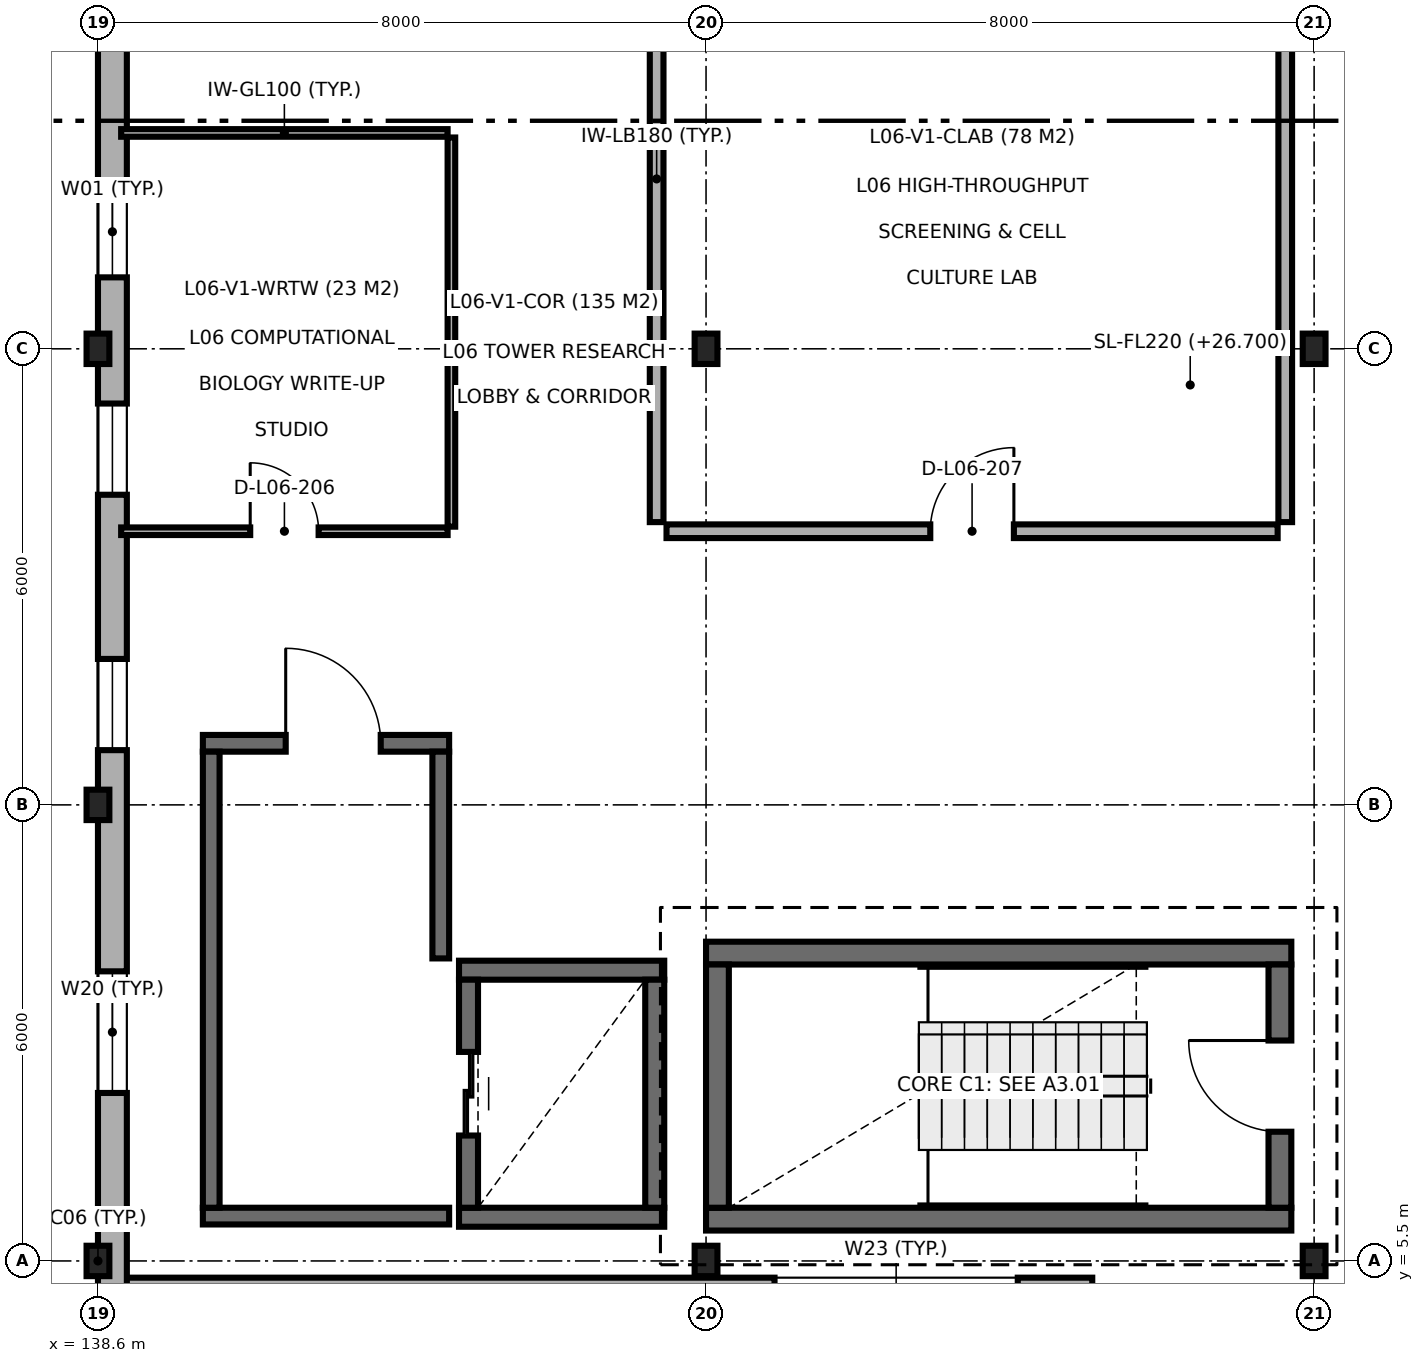
"""IFC4 building model, lengths in metres.
Left out: names, types, materials, properties, quantities, classifications, styles, units other than length and angle.
Written with IfcOpenShell. Run it as: python <this file> out.ifc"""

import sys

from ifc_helpers import new_model, si_unit, direction, frame, frame_2d, origin, origin_2d, place, context, subcontext, project, spatial, rectangle, i_section, extrude, element, fill, save


model = new_model("IFC4")
c1 = context("Model", 3, precision=1e-05, world=origin(), true_north=direction((0.0, 1.0)))
c2 = subcontext(c1, "Body", "Model", "MODEL_VIEW")
j1 = project(units=[si_unit("LENGTHUNIT", "METRE"), si_unit("PLANEANGLEUNIT", "RADIAN")], contexts=[c1])
p1 = place(None, origin())
s1 = spatial("IfcSite", under=j1, at=p1, CompositionType="ELEMENT")
p2 = place(p1, origin())
s2 = spatial("IfcBuilding", under=s1, at=p2, CompositionType="ELEMENT")
p3 = place(p2, frame((0.0, 0.0, 26.7)))
s3 = spatial("IfcBuildingStorey", under=s2, at=p3, CompositionType="ELEMENT", Elevation=26.7)
for number, where, z_axis, x_axis in (
    (1, (138.6, 5.5, 0.0), (0.0, 0.0, 1.0), (1.0, 0.0, 0.0)),
    (2, (138.6, 11.5, 0.0), (0.0, 0.0, 1.0), (1.0, 0.0, 0.0)),
    (3, (138.6, 17.5, 0.0), (0.0, 0.0, 1.0), (1.0, 0.0, 0.0)),
    (4, (146.6, 5.5, 0.0), (0.0, 0.0, 1.0), (1.0, 0.0, 0.0)),
    (5, (146.6, 17.5, 0.0), (0.0, 0.0, 1.0), (1.0, 0.0, 0.0)),
    (6, (154.6, 5.5, 0.0), (0.0, 0.0, 1.0), (1.0, 0.0, 0.0)),
    (7, (154.6, 17.5, 0.0), (0.0, 0.0, 1.0), (1.0, 0.0, 0.0)),
):
    element("IfcColumn", number, at=place(p3, frame(where, z_axis=z_axis, x_axis=x_axis)), inside=s3, PredefinedType="COLUMN", context=c2, shape_type="SweptSolid", body=[
        extrude(i_section(OverallWidth=0.3, OverallDepth=0.4, WebThickness=0.013, FlangeThickness=0.024, FilletRadius=0.027, at=origin_2d()), origin(), (0.0, 0.0, 1.0), 3.9),
    ])
for number, where, z_axis, x_axis in (
    (8, (146.6, 6.05, 0.0), (0.0, 0.0, 1.0), (1.0, 0.0, 0.0)),
    (9, (154.3, 9.55, 0.0), (0.0, 0.0, 1.0), (-1.0, 0.0, 0.0)),
):
    element("IfcWall", number, at=place(p3, frame(where, z_axis=z_axis, x_axis=x_axis)), inside=s3, PredefinedType="SHEAR", context=c2, shape_type="SweptSolid", body=[
        extrude(rectangle(XDim=7.7, YDim=0.3, at=frame_2d((3.85, 0.0))), origin(), (0.0, 0.0, 1.0), 3.9),
    ])
p4 = place(p3, frame((146.75, 9.4, 0.0), z_axis=(0.0, 0.0, 1.0), x_axis=(0.0, -1.0, 0.0)))
e10 = element("IfcWall", 10, at=p4, inside=s3, PredefinedType="SHEAR", context=c2, shape_type="SweptSolid", body=[
    extrude(rectangle(XDim=3.2, YDim=0.3, at=frame_2d((1.6, 0.0))), origin(), (0.0, 0.0, 1.0), 3.9),
])
p5 = place(p3, frame((154.15, 6.2, 0.0), z_axis=(0.0, 0.0, 1.0), x_axis=(0.0, 1.0, 0.0)))
e11 = element("IfcWall", 11, at=p5, inside=s3, PredefinedType="SHEAR", context=c2, shape_type="SweptSolid", body=[
    extrude(rectangle(XDim=3.2, YDim=0.3, at=frame_2d((1.6, 0.0))), origin(), (0.0, 0.0, 1.0), 3.9),
])
p6 = place(p5, frame((1.0, 0.0, 0.0)))
e12 = element("IfcOpeningElement", 12, at=p6, cuts=e11, PredefinedType="OPENING", context=c2, shape_type="SweptSolid", body=[
    extrude(rectangle(XDim=1.2, YDim=2.15, at=frame_2d((0.6, 1.075))), frame((0.0, 0.16, 0.0), z_axis=(0.0, -1.0, 0.0), x_axis=(1.0, 0.0, 0.0)), (0.0, 0.0, 1.0), 0.32),
])
for number, where, z_axis, x_axis in (
    (13, (143.35, 6.075, 0.0), (0.0, 0.0, 1.0), (1.0, 0.0, 0.0)),
    (14, (146.05, 9.325, 0.0), (0.0, 0.0, 1.0), (-1.0, 0.0, 0.0)),
):
    element("IfcWall", number, at=place(p3, frame(where, z_axis=z_axis, x_axis=x_axis)), inside=s3, PredefinedType="SHEAR", context=c2, shape_type="SweptSolid", body=[
        extrude(rectangle(XDim=2.7, YDim=0.25, at=frame_2d((1.35, 0.0))), origin(), (0.0, 0.0, 1.0), 3.9),
    ])
p7 = place(p3, frame((143.475, 9.2, 0.0), z_axis=(0.0, 0.0, 1.0), x_axis=(0.0, -1.0, 0.0)))
e15 = element("IfcWall", 15, at=p7, inside=s3, PredefinedType="SHEAR", context=c2, shape_type="SweptSolid", body=[
    extrude(rectangle(XDim=3.0, YDim=0.25, at=frame_2d((1.5, 0.0))), origin(), (0.0, 0.0, 1.0), 3.9),
])
p8 = place(p7, frame((0.95, 0.0, 0.0)))
e16 = element("IfcOpeningElement", 16, at=p8, cuts=e15, PredefinedType="OPENING", context=c2, shape_type="SweptSolid", body=[
    extrude(rectangle(XDim=1.1, YDim=2.15, at=frame_2d((0.55, 1.075))), frame((0.0, 0.135, 0.0), z_axis=(0.0, -1.0, 0.0), x_axis=(1.0, 0.0, 0.0)), (0.0, 0.0, 1.0), 0.27),
])
p9 = place(p3, frame((145.925, 6.2, 0.0), z_axis=(0.0, 0.0, 1.0), x_axis=(0.0, 1.0, 0.0)))
e17 = element("IfcWall", 17, at=p9, inside=s3, PredefinedType="SHEAR", context=c2, shape_type="SweptSolid", body=[
    extrude(rectangle(XDim=3.0, YDim=0.25, at=frame_2d((1.5, 0.0))), origin(), (0.0, 0.0, 1.0), 3.9),
])
p10 = place(p3, frame((139.98, 6.09, 0.0), z_axis=(0.0, 0.0, 1.0), x_axis=(1.0, 0.0, 0.0)))
e18 = element("IfcWall", 18, at=p10, inside=s3, PredefinedType="SOLIDWALL", context=c2, shape_type="SweptSolid", body=[
    extrude(rectangle(XDim=3.24, YDim=0.22, at=frame_2d((1.62, 0.0))), origin(), (0.0, 0.0, 1.0), 3.68),
])
p11 = place(p3, frame((143.22, 12.31, 0.0), z_axis=(0.0, 0.0, 1.0), x_axis=(-1.0, 0.0, 0.0)))
e19 = element("IfcWall", 19, at=p11, inside=s3, PredefinedType="SOLIDWALL", context=c2, shape_type="SweptSolid", body=[
    extrude(rectangle(XDim=3.24, YDim=0.22, at=frame_2d((1.62, 0.0))), origin(), (0.0, 0.0, 1.0), 3.68),
])
p12 = place(p11, frame((0.9, 0.0, 0.0)))
e20 = element("IfcOpeningElement", 20, at=p12, cuts=e19, PredefinedType="OPENING", context=c2, shape_type="SweptSolid", body=[
    extrude(rectangle(XDim=1.25, YDim=2.15, at=frame_2d((0.625, 1.075))), frame((0.0, 0.12, 0.0), z_axis=(0.0, -1.0, 0.0), x_axis=(1.0, 0.0, 0.0)), (0.0, 0.0, 1.0), 0.24),
])
p13 = place(p3, frame((140.09, 12.2, 0.0), z_axis=(0.0, 0.0, 1.0), x_axis=(0.0, -1.0, 0.0)))
e21 = element("IfcWall", 21, at=p13, inside=s3, PredefinedType="SOLIDWALL", context=c2, shape_type="SweptSolid", body=[
    extrude(rectangle(XDim=6.0, YDim=0.22, at=frame_2d((3.0, 0.0))), origin(), (0.0, 0.0, 1.0), 3.68),
])
p14 = place(p3, frame((143.11, 9.48, 0.0), z_axis=(0.0, 0.0, 1.0), x_axis=(0.0, 1.0, 0.0)))
e22 = element("IfcWall", 22, at=p14, inside=s3, PredefinedType="SOLIDWALL", context=c2, shape_type="SweptSolid", body=[
    extrude(rectangle(XDim=2.72, YDim=0.22, at=frame_2d((1.36, 0.0))), origin(), (0.0, 0.0, 1.0), 3.68),
])
p15 = place(p3, frame((138.962, 5.09, 0.0), z_axis=(0.0, 0.0, 1.0), x_axis=(1.0, 0.0, 0.0)))
e23 = element("IfcWall", 23, at=p15, inside=s3, PredefinedType="SOLIDWALL", context=c2, shape_type="SweptSolid", body=[
    extrude(rectangle(XDim=12.719, YDim=0.38, at=frame_2d((6.359, 0.0))), origin(), (0.0, 0.0, 1.0), 3.68),
])
p16 = place(p15, frame((8.539, 0.0, 0.9)))
e24 = element("IfcOpeningElement", 24, at=p16, cuts=e23, PredefinedType="OPENING", context=c2, shape_type="SweptSolid", body=[
    extrude(rectangle(XDim=3.2, YDim=2.4, at=frame_2d((1.6, 1.2))), frame((0.0, 0.2, 0.0), z_axis=(0.0, -1.0, 0.0), x_axis=(1.0, 0.0, 0.0)), (0.0, 0.0, 1.0), 0.4),
])
p17 = place(p3, frame((138.79, 29.138, 0.0), z_axis=(0.0, 0.0, 1.0), x_axis=(0.0, -1.0, 0.0)))
e25 = element("IfcWall", 25, at=p17, inside=s3, PredefinedType="SOLIDWALL", context=c2, shape_type="SweptSolid", body=[
    extrude(rectangle(XDim=24.238, YDim=0.38, at=frame_2d((12.119, 0.0))), origin(), (0.0, 0.0, 1.0), 3.68),
])
p18 = place(p17, frame((1.364, 0.0, 0.9)))
e26 = element("IfcOpeningElement", 26, at=p18, cuts=e25, PredefinedType="OPENING", context=c2, shape_type="SweptSolid", body=[
    extrude(rectangle(XDim=2.4, YDim=2.1, at=frame_2d((1.2, 1.05))), frame((0.0, 0.2, 0.0), z_axis=(0.0, -1.0, 0.0), x_axis=(1.0, 0.0, 0.0)), (0.0, 0.0, 1.0), 0.4),
])
p19 = place(p17, frame((9.498, 0.0, 0.9)))
e27 = element("IfcOpeningElement", 27, at=p19, cuts=e25, PredefinedType="OPENING", context=c2, shape_type="SweptSolid", body=[
    extrude(rectangle(XDim=1.2, YDim=1.8, at=frame_2d((0.6, 0.9))), frame((0.0, 0.2, 0.0), z_axis=(0.0, -1.0, 0.0), x_axis=(1.0, 0.0, 0.0)), (0.0, 0.0, 1.0), 0.4),
])
p20 = place(p17, frame((12.358, 0.0, 0.9)))
e28 = element("IfcOpeningElement", 28, at=p20, cuts=e25, PredefinedType="OPENING", context=c2, shape_type="SweptSolid", body=[
    extrude(rectangle(XDim=1.2, YDim=1.8, at=frame_2d((0.6, 0.9))), frame((0.0, 0.2, 0.0), z_axis=(0.0, -1.0, 0.0), x_axis=(1.0, 0.0, 0.0)), (0.0, 0.0, 1.0), 0.4),
])
p21 = place(p17, frame((15.718, 0.0, 0.9)))
e29 = element("IfcOpeningElement", 29, at=p21, cuts=e25, PredefinedType="OPENING", context=c2, shape_type="SweptSolid", body=[
    extrude(rectangle(XDim=1.2, YDim=1.8, at=frame_2d((0.6, 0.9))), frame((0.0, 0.2, 0.0), z_axis=(0.0, -1.0, 0.0), x_axis=(1.0, 0.0, 0.0)), (0.0, 0.0, 1.0), 0.4),
])
p22 = place(p17, frame((19.828, 0.0, 0.9)))
e30 = element("IfcOpeningElement", 30, at=p22, cuts=e25, PredefinedType="OPENING", context=c2, shape_type="SweptSolid", body=[
    extrude(rectangle(XDim=1.6, YDim=2.4, at=frame_2d((0.8, 1.2))), frame((0.0, 0.2, 0.0), z_axis=(0.0, -1.0, 0.0), x_axis=(1.0, 0.0, 0.0)), (0.0, 0.0, 1.0), 0.4),
])
p23 = place(p3, frame((138.905, 20.34, 0.0), z_axis=(0.0, 0.0, 1.0), x_axis=(1.0, 0.0, 0.0)))
e31 = element("IfcWall", 31, at=p23, inside=s3, PredefinedType="PARTITIONING", context=c2, shape_type="SweptSolid", body=[
    extrude(rectangle(XDim=4.295, YDim=0.1, at=frame_2d((2.147, 0.0))), origin(), (0.0, 0.0, 1.0), 3.68),
])
p24 = place(p3, frame((143.25, 15.16, 0.0), z_axis=(0.0, 0.0, 1.0), x_axis=(0.0, 1.0, 0.0)))
e32 = element("IfcWall", 32, at=p24, inside=s3, PredefinedType="PARTITIONING", context=c2, shape_type="SweptSolid", body=[
    extrude(rectangle(XDim=5.12, YDim=0.1, at=frame_2d((2.56, 0.0))), origin(), (0.0, 0.0, 1.0), 3.68),
])
p25 = place(p3, frame((138.905, 15.1, 0.0), z_axis=(0.0, 0.0, 1.0), x_axis=(1.0, 0.0, 0.0)))
e33 = element("IfcWall", 33, at=p25, inside=s3, PredefinedType="PARTITIONING", context=c2, shape_type="SweptSolid", body=[
    extrude(rectangle(XDim=4.295, YDim=0.1, at=frame_2d((2.147, 0.0))), origin(), (0.0, 0.0, 1.0), 3.68),
])
p26 = place(p25, frame((1.698, 0.0, 0.0)))
e34 = element("IfcOpeningElement", 34, at=p26, cuts=e33, PredefinedType="OPENING", context=c2, shape_type="SweptSolid", body=[
    extrude(rectangle(XDim=0.9, YDim=2.1, at=frame_2d((0.45, 1.05))), frame((0.0, 0.06, 0.0), z_axis=(0.0, -1.0, 0.0), x_axis=(1.0, 0.0, 0.0)), (0.0, 0.0, 1.0), 0.12),
])
for number, where, z_axis, x_axis in (
    (35, (145.95, 15.22, 0.0), (0.0, 0.0, 1.0), (0.0, 1.0, 0.0)),
    (36, (154.22, 15.22, 0.0), (0.0, 0.0, 1.0), (0.0, 1.0, 0.0)),
):
    element("IfcWall", number, at=place(p3, frame(where, z_axis=z_axis, x_axis=x_axis)), inside=s3, PredefinedType="PARTITIONING", context=c2, shape_type="SweptSolid", body=[
        extrude(rectangle(XDim=9.03, YDim=0.18, at=frame_2d((4.515, 0.0))), origin(), (0.0, 0.0, 1.0), 3.68),
    ])
p27 = place(p3, frame((146.08, 15.1, 0.0), z_axis=(0.0, 0.0, 1.0), x_axis=(1.0, 0.0, 0.0)))
e37 = element("IfcWall", 37, at=p27, inside=s3, PredefinedType="PARTITIONING", context=c2, shape_type="SweptSolid", body=[
    extrude(rectangle(XDim=8.04, YDim=0.18, at=frame_2d((4.02, 0.0))), origin(), (0.0, 0.0, 1.0), 3.68),
])
p28 = place(p27, frame((3.47, 0.0, 0.0)))
e38 = element("IfcOpeningElement", 38, at=p28, cuts=e37, PredefinedType="OPENING", context=c2, shape_type="SweptSolid", body=[
    extrude(rectangle(XDim=1.1, YDim=2.15, at=frame_2d((0.55, 1.075))), frame((0.0, 0.1, 0.0), z_axis=(0.0, -1.0, 0.0), x_axis=(1.0, 0.0, 0.0)), (0.0, 0.0, 1.0), 0.2),
])
p29 = place(p6, origin())
e39 = element("IfcDoor", 39, at=p29, inside=s3, OperationType="SINGLE_SWING_RIGHT", PredefinedType="DOOR", context=c2, shape_type="SweptSolid", body=[
    extrude(rectangle(XDim=1.2, YDim=2.15, at=frame_2d((0.6, 1.075))), frame((0.0, 0.025, 0.0), z_axis=(0.0, -1.0, 0.0), x_axis=(1.0, 0.0, 0.0)), (0.0, 0.0, 1.0), 0.05),
])
fill(e12, e39)
p30 = place(p8, origin())
e40 = element("IfcDoor", 40, at=p30, inside=s3, OperationType="DOUBLE_DOOR_SLIDING", PredefinedType="DOOR", context=c2, shape_type="SweptSolid", body=[
    extrude(rectangle(XDim=1.1, YDim=2.15, at=frame_2d((0.55, 1.075))), frame((0.0, 0.025, 0.0), z_axis=(0.0, -1.0, 0.0), x_axis=(1.0, 0.0, 0.0)), (0.0, 0.0, 1.0), 0.05),
])
fill(e16, e40)
p31 = place(p12, frame((1.25, 0.0, 0.0), z_axis=(0.0, 0.0, 1.0), x_axis=(-1.0, 0.0, 0.0)))
e41 = element("IfcDoor", 41, at=p31, inside=s3, OperationType="SINGLE_SWING_RIGHT", PredefinedType="DOOR", context=c2, shape_type="SweptSolid", body=[
    extrude(rectangle(XDim=1.25, YDim=2.15, at=frame_2d((0.625, 1.075))), frame((0.0, 0.025, 0.0), z_axis=(0.0, -1.0, 0.0), x_axis=(1.0, 0.0, 0.0)), (0.0, 0.0, 1.0), 0.05),
])
fill(e20, e41)
p32 = place(p19, origin())
e42 = element("IfcWindow", 42, at=p32, inside=s3, PartitioningType="SINGLE_PANEL", PredefinedType="WINDOW", context=c2, shape_type="SweptSolid", body=[
    extrude(rectangle(XDim=1.2, YDim=1.8, at=frame_2d((0.6, 0.9))), frame((0.0, 0.03, 0.0), z_axis=(0.0, -1.0, 0.0), x_axis=(1.0, 0.0, 0.0)), (0.0, 0.0, 1.0), 0.06),
])
fill(e27, e42)
p33 = place(p20, origin())
e43 = element("IfcWindow", 43, at=p33, inside=s3, PartitioningType="SINGLE_PANEL", PredefinedType="WINDOW", context=c2, shape_type="SweptSolid", body=[
    extrude(rectangle(XDim=1.2, YDim=1.8, at=frame_2d((0.6, 0.9))), frame((0.0, 0.03, 0.0), z_axis=(0.0, -1.0, 0.0), x_axis=(1.0, 0.0, 0.0)), (0.0, 0.0, 1.0), 0.06),
])
fill(e28, e43)
p34 = place(p21, origin())
e44 = element("IfcWindow", 44, at=p34, inside=s3, PartitioningType="SINGLE_PANEL", PredefinedType="WINDOW", context=c2, shape_type="SweptSolid", body=[
    extrude(rectangle(XDim=1.2, YDim=1.8, at=frame_2d((0.6, 0.9))), frame((0.0, 0.03, 0.0), z_axis=(0.0, -1.0, 0.0), x_axis=(1.0, 0.0, 0.0)), (0.0, 0.0, 1.0), 0.06),
])
fill(e29, e44)
p35 = place(p22, origin())
e45 = element("IfcWindow", 45, at=p35, inside=s3, PartitioningType="SINGLE_PANEL", PredefinedType="WINDOW", context=c2, shape_type="SweptSolid", body=[
    extrude(rectangle(XDim=1.6, YDim=2.4, at=frame_2d((0.8, 1.2))), frame((0.0, 0.03, 0.0), z_axis=(0.0, -1.0, 0.0), x_axis=(1.0, 0.0, 0.0)), (0.0, 0.0, 1.0), 0.06),
])
fill(e30, e45)
p36 = place(p26, origin())
e46 = element("IfcDoor", 46, at=p36, inside=s3, OperationType="SINGLE_SWING_LEFT", PredefinedType="DOOR", context=c2, shape_type="SweptSolid", body=[
    extrude(rectangle(XDim=0.9, YDim=2.1, at=frame_2d((0.45, 1.05))), frame((0.0, 0.025, 0.0), z_axis=(0.0, -1.0, 0.0), x_axis=(1.0, 0.0, 0.0)), (0.0, 0.0, 1.0), 0.05),
])
fill(e34, e46)
p37 = place(p28, origin())
e47 = element("IfcDoor", 47, at=p37, inside=s3, OperationType="SINGLE_SWING_RIGHT", PredefinedType="DOOR", context=c2, shape_type="SweptSolid", body=[
    extrude(rectangle(XDim=1.1, YDim=2.15, at=frame_2d((0.55, 1.075))), frame((0.0, 0.025, 0.0), z_axis=(0.0, -1.0, 0.0), x_axis=(1.0, 0.0, 0.0)), (0.0, 0.0, 1.0), 0.05),
])
fill(e38, e47)
save(model, sys.argv[1])
